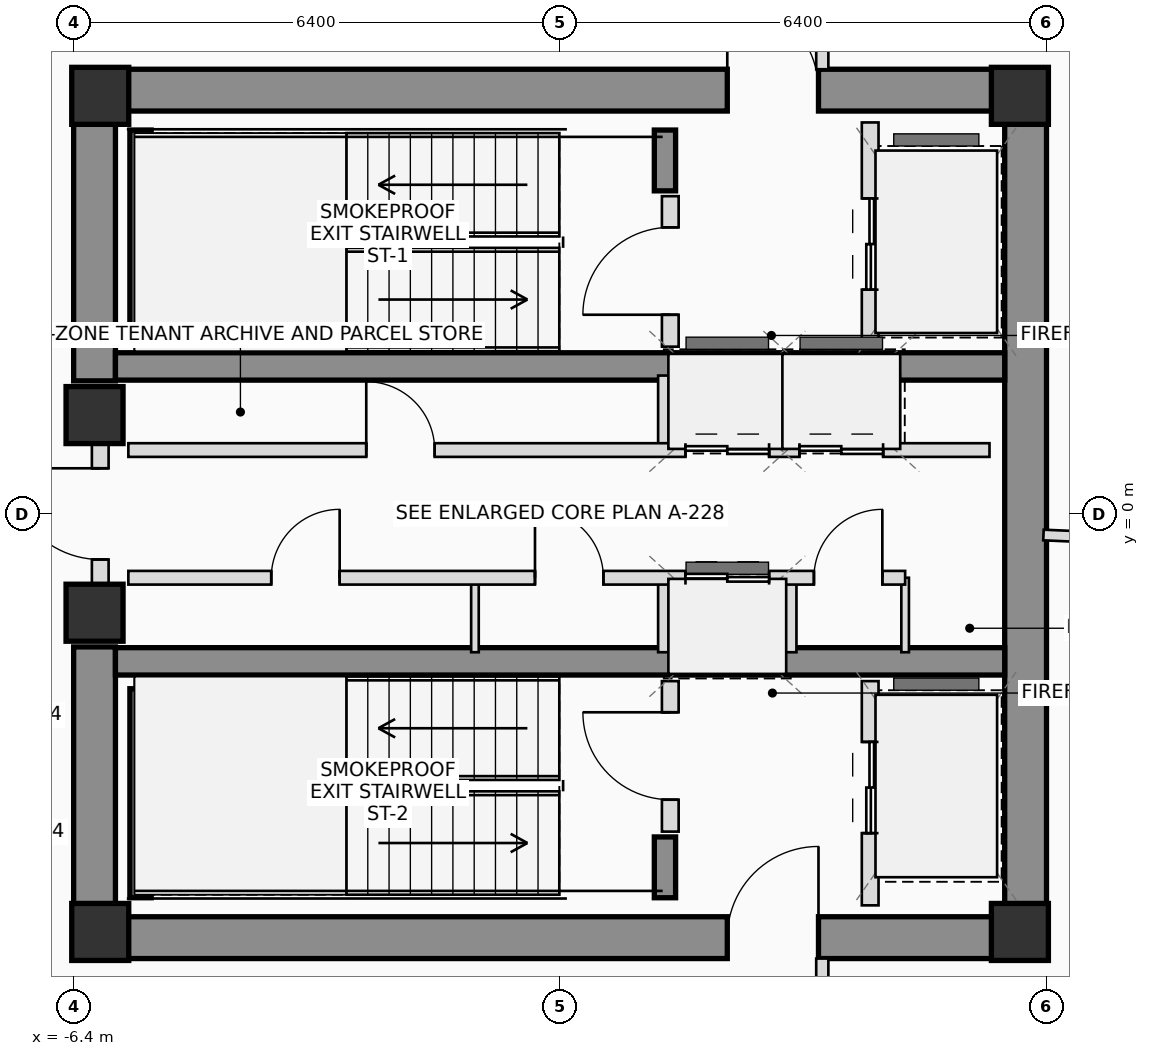
"""IFC4 building model, lengths in metres.
Left out: names, types, materials, properties, quantities, classifications, styles, units other than length and angle.
Written with IfcOpenShell. Run it as: python <this file> out.ifc"""

import sys

from ifc_helpers import new_model, si_unit, direction, frame, frame_2d, origin, origin_2d, place, context, subcontext, project, spatial, rectangle, extrude, source, transform, mapped, element, fill, save


model = new_model("IFC4")
c1 = context("Model", 3, precision=1e-05, world=origin(), true_north=direction((0.0, 1.0)))
c2 = subcontext(c1, "Body", "Model", "MODEL_VIEW")
j1 = project(units=[si_unit("LENGTHUNIT", "METRE"), si_unit("PLANEANGLEUNIT", "RADIAN")], contexts=[c1])
p1 = place(None, origin())
s1 = spatial("IfcSite", under=j1, at=p1, CompositionType="ELEMENT")
p2 = place(p1, origin())
s2 = spatial("IfcBuilding", under=s1, at=p2, CompositionType="ELEMENT")
p3 = place(p2, frame((0.0, 0.0, 310.55)))
s3 = spatial("IfcBuildingStorey", under=s2, at=p3, CompositionType="ELEMENT", Elevation=310.55)
m1 = source(origin(), c2, "Body", "SweptSolid", [
    extrude(rectangle(XDim=0.75, YDim=0.75, at=origin_2d()), origin(), (0.0, 0.0, 1.0), 3.45),
])
for number, where, z_axis, x_axis in (
    (1, (-6.05, -5.5, 0.0), (0.0, 0.0, 1.0), (1.0, 0.0, 0.0)),
    (2, (6.05, -5.5, 0.0), (0.0, 0.0, 1.0), (1.0, 0.0, 0.0)),
    (3, (6.05, 5.5, 0.0), (0.0, 0.0, 1.0), (1.0, 0.0, 0.0)),
    (4, (-6.05, 5.5, 0.0), (0.0, 0.0, 1.0), (1.0, 0.0, 0.0)),
):
    element("IfcColumn", number, at=place(p3, frame(where, z_axis=z_axis, x_axis=x_axis)), inside=s3, PredefinedType="COLUMN", context=c2, shape_type="MappedRepresentation", body=[
        mapped(m1, transform((0.0, 0.0, 0.0), scale=1.0)),
    ])
p4 = place(p3, frame((-6.4, 5.575, 0.0), z_axis=(0.0, 0.0, 1.0), x_axis=(1.0, 0.0, 0.0)))
e5 = element("IfcWall", 5, at=p4, inside=s3, PredefinedType="SHEAR", context=c2, shape_type="SweptSolid", body=[
    extrude(rectangle(XDim=12.8, YDim=0.55, at=frame_2d((6.4, 0.0))), origin(), (0.0, 0.0, 1.0), 3.45),
])
p5 = place(p4, frame((8.6, 0.0, 0.0)))
e6 = element("IfcOpeningElement", 6, at=p5, cuts=e5, PredefinedType="OPENING", context=c2, shape_type="SweptSolid", body=[
    extrude(rectangle(XDim=1.2, YDim=2.2, at=frame_2d((0.6, 1.1))), frame((0.0, 0.285, 0.0), z_axis=(0.0, -1.0, 0.0), x_axis=(1.0, 0.0, 0.0)), (0.0, 0.0, 1.0), 0.57),
])
p6 = place(p3, frame((-6.4, -5.575, 0.0), z_axis=(0.0, 0.0, 1.0), x_axis=(1.0, 0.0, 0.0)))
e7 = element("IfcWall", 7, at=p6, inside=s3, PredefinedType="SHEAR", context=c2, shape_type="SweptSolid", body=[
    extrude(rectangle(XDim=12.8, YDim=0.55, at=frame_2d((6.4, 0.0))), origin(), (0.0, 0.0, 1.0), 3.45),
])
p7 = place(p6, frame((8.6, 0.0, 0.0)))
e8 = element("IfcOpeningElement", 8, at=p7, cuts=e7, PredefinedType="OPENING", context=c2, shape_type="SweptSolid", body=[
    extrude(rectangle(XDim=1.2, YDim=2.2, at=frame_2d((0.6, 1.1))), frame((0.0, 0.285, 0.0), z_axis=(0.0, -1.0, 0.0), x_axis=(1.0, 0.0, 0.0)), (0.0, 0.0, 1.0), 0.57),
])
p8 = place(p3, frame((6.125, -5.3, 0.0), z_axis=(0.0, 0.0, 1.0), x_axis=(0.0, 1.0, 0.0)))
e9 = element("IfcWall", 9, at=p8, inside=s3, PredefinedType="SHEAR", context=c2, shape_type="SweptSolid", body=[
    extrude(rectangle(XDim=10.6, YDim=0.55, at=frame_2d((5.3, 0.0))), origin(), (0.0, 0.0, 1.0), 3.45),
])
for number, where, z_axis, x_axis in (
    (10, (-6.125, -5.3, 0.0), (0.0, 0.0, 1.0), (0.0, 1.0, 0.0)),
    (11, (-6.125, 1.75, 0.0), (0.0, 0.0, 1.0), (0.0, 1.0, 0.0)),
):
    element("IfcWall", number, at=place(p3, frame(where, z_axis=z_axis, x_axis=x_axis)), inside=s3, PredefinedType="SHEAR", context=c2, shape_type="SweptSolid", body=[
        extrude(rectangle(XDim=3.55, YDim=0.55, at=frame_2d((1.775, 0.0))), origin(), (0.0, 0.0, 1.0), 3.45),
    ])
for number, where, z_axis, x_axis in (
    (12, (-5.85, 1.94, 0.0), (0.0, 0.0, 1.0), (1.0, 0.0, 0.0)),
    (13, (-5.85, -1.94, 0.0), (0.0, 0.0, 1.0), (1.0, 0.0, 0.0)),
):
    element("IfcWall", number, at=place(p3, frame(where, z_axis=z_axis, x_axis=x_axis)), inside=s3, PredefinedType="SHEAR", context=c2, shape_type="SweptSolid", body=[
        extrude(rectangle(XDim=11.7, YDim=0.36, at=frame_2d((5.85, 0.0))), origin(), (0.0, 0.0, 1.0), 3.45),
    ])
p9 = place(p3, frame((-5.52, 2.3, 0.0), z_axis=(0.0, 0.0, 1.0), x_axis=(0.0, 1.0, 0.0)))
e14 = element("IfcWall", 14, at=p9, inside=s3, PredefinedType="SHEAR", context=c2, shape_type="SweptSolid", body=[
    extrude(rectangle(XDim=2.75, YDim=0.28, at=frame_2d((1.375, 0.0))), origin(), (0.0, 0.0, 1.0), 3.45),
])
p10 = place(p3, frame((1.38, 4.25, 0.0), z_axis=(0.0, 0.0, 1.0), x_axis=(0.0, 1.0, 0.0)))
e15 = element("IfcWall", 15, at=p10, inside=s3, PredefinedType="SHEAR", context=c2, shape_type="SweptSolid", body=[
    extrude(rectangle(XDim=0.8, YDim=0.28, at=frame_2d((0.4, 0.0))), origin(), (0.0, 0.0, 1.0), 3.45),
])
p11 = place(p3, frame((-5.52, -5.05, 0.0), z_axis=(0.0, 0.0, 1.0), x_axis=(0.0, 1.0, 0.0)))
e16 = element("IfcWall", 16, at=p11, inside=s3, PredefinedType="SHEAR", context=c2, shape_type="SweptSolid", body=[
    extrude(rectangle(XDim=2.75, YDim=0.28, at=frame_2d((1.375, 0.0))), origin(), (0.0, 0.0, 1.0), 3.45),
])
p12 = place(p3, frame((1.38, -5.05, 0.0), z_axis=(0.0, 0.0, 1.0), x_axis=(0.0, 1.0, 0.0)))
e17 = element("IfcWall", 17, at=p12, inside=s3, PredefinedType="SHEAR", context=c2, shape_type="SweptSolid", body=[
    extrude(rectangle(XDim=0.8, YDim=0.28, at=frame_2d((0.4, 0.0))), origin(), (0.0, 0.0, 1.0), 3.45),
])
for number, where, z_axis, x_axis in (
    (18, (-6.125, -1.3, 0.0), (0.0, 0.0, 1.0), (1.0, 0.0, 0.0)),
    (19, (-6.125, 1.3, 0.0), (0.0, 0.0, 1.0), (1.0, 0.0, 0.0)),
):
    element("IfcColumn", number, at=place(p3, frame(where, z_axis=z_axis, x_axis=x_axis)), inside=s3, PredefinedType="COLUMN", context=c2, shape_type="MappedRepresentation", body=[
        mapped(m1, transform((0.0, 0.0, 0.0), scale=1.0)),
    ])
p13 = place(p3, frame((-6.05, -0.95, 0.0), z_axis=(0.0, 0.0, 1.0), x_axis=(0.0, 1.0, 0.0)))
e20 = element("IfcWall", 20, at=p13, inside=s3, PredefinedType="PLUMBINGWALL", context=c2, shape_type="SweptSolid", body=[
    extrude(rectangle(XDim=1.9, YDim=0.22, at=frame_2d((0.95, 0.0))), origin(), (0.0, 0.0, 1.0), 2.23),
])
p14 = place(p13, frame((0.35, 0.0, 0.0)))
e21 = element("IfcOpeningElement", 21, at=p14, cuts=e20, PredefinedType="OPENING", context=c2, shape_type="SweptSolid", body=[
    extrude(rectangle(XDim=1.2, YDim=2.2, at=frame_2d((0.6, 1.1))), frame((0.0, 0.12, 0.0), z_axis=(0.0, -1.0, 0.0), x_axis=(1.0, 0.0, 0.0)), (0.0, 0.0, 1.0), 0.24),
])
p15 = place(p3, frame((1.45, 2.2, 0.0), z_axis=(0.0, 0.0, 1.0), x_axis=(0.0, 1.0, 0.0)))
e22 = element("IfcWall", 22, at=p15, inside=s3, PredefinedType="PLUMBINGWALL", context=c2, shape_type="SweptSolid", body=[
    extrude(rectangle(XDim=1.98, YDim=0.22, at=frame_2d((0.99, 0.0))), origin(), (0.0, 0.0, 1.0), 3.25),
])
p16 = place(p15, frame((0.42, 0.0, 0.0)))
e23 = element("IfcOpeningElement", 23, at=p16, cuts=e22, PredefinedType="OPENING", context=c2, shape_type="SweptSolid", body=[
    extrude(rectangle(XDim=1.15, YDim=2.15, at=frame_2d((0.575, 1.075))), frame((0.0, 0.12, 0.0), z_axis=(0.0, -1.0, 0.0), x_axis=(1.0, 0.0, 0.0)), (0.0, 0.0, 1.0), 0.24),
])
p17 = place(p3, frame((4.08, 2.2, 0.0), z_axis=(0.0, 0.0, 1.0), x_axis=(0.0, 1.0, 0.0)))
e24 = element("IfcWall", 24, at=p17, inside=s3, PredefinedType="PLUMBINGWALL", context=c2, shape_type="SweptSolid", body=[
    extrude(rectangle(XDim=2.95, YDim=0.22, at=frame_2d((1.475, 0.0))), origin(), (0.0, 0.0, 1.0), 3.25),
])
p18 = place(p17, frame((0.75, 0.0, 0.0)))
e25 = element("IfcOpeningElement", 25, at=p18, cuts=e24, PredefinedType="OPENING", context=c2, shape_type="SweptSolid", body=[
    extrude(rectangle(XDim=1.2, YDim=2.25, at=frame_2d((0.6, 1.125))), frame((0.0, 0.12, 0.0), z_axis=(0.0, -1.0, 0.0), x_axis=(1.0, 0.0, 0.0)), (0.0, 0.0, 1.0), 0.24),
])
p19 = place(p3, frame((1.45, -4.18, 0.0), z_axis=(0.0, 0.0, 1.0), x_axis=(0.0, 1.0, 0.0)))
e26 = element("IfcWall", 26, at=p19, inside=s3, PredefinedType="PLUMBINGWALL", context=c2, shape_type="SweptSolid", body=[
    extrude(rectangle(XDim=1.98, YDim=0.22, at=frame_2d((0.99, 0.0))), origin(), (0.0, 0.0, 1.0), 3.25),
])
p20 = place(p19, frame((0.42, 0.0, 0.0)))
e27 = element("IfcOpeningElement", 27, at=p20, cuts=e26, PredefinedType="OPENING", context=c2, shape_type="SweptSolid", body=[
    extrude(rectangle(XDim=1.15, YDim=2.15, at=frame_2d((0.575, 1.075))), frame((0.0, 0.12, 0.0), z_axis=(0.0, -1.0, 0.0), x_axis=(1.0, 0.0, 0.0)), (0.0, 0.0, 1.0), 0.24),
])
p21 = place(p3, frame((4.08, -5.15, 0.0), z_axis=(0.0, 0.0, 1.0), x_axis=(0.0, 1.0, 0.0)))
e28 = element("IfcWall", 28, at=p21, inside=s3, PredefinedType="PLUMBINGWALL", context=c2, shape_type="SweptSolid", body=[
    extrude(rectangle(XDim=2.95, YDim=0.22, at=frame_2d((1.475, 0.0))), origin(), (0.0, 0.0, 1.0), 3.25),
])
p22 = place(p21, frame((0.95, 0.0, 0.0)))
e29 = element("IfcOpeningElement", 29, at=p22, cuts=e28, PredefinedType="OPENING", context=c2, shape_type="SweptSolid", body=[
    extrude(rectangle(XDim=1.2, YDim=2.25, at=frame_2d((0.6, 1.125))), frame((0.0, 0.12, 0.0), z_axis=(0.0, -1.0, 0.0), x_axis=(1.0, 0.0, 0.0)), (0.0, 0.0, 1.0), 0.24),
])
p23 = place(p3, frame((-1.12, -1.82, 0.0), z_axis=(0.0, 0.0, 1.0), x_axis=(0.0, 1.0, 0.0)))
e30 = element("IfcWall", 30, at=p23, inside=s3, PredefinedType="PARTITIONING", context=c2, shape_type="SweptSolid", body=[
    extrude(rectangle(XDim=0.98, YDim=0.1, at=frame_2d((0.49, 0.0))), origin(), (0.0, 0.0, 1.0), 3.25),
])
for number, where, z_axis, x_axis in (
    (31, (1.38, 0.84, 0.0), (0.0, 0.0, 1.0), (0.0, 1.0, 0.0)),
    (32, (1.38, -1.82, 0.0), (0.0, 0.0, 1.0), (0.0, 1.0, 0.0)),
    (33, (3.02, 0.84, 0.0), (0.0, 0.0, 1.0), (0.0, 1.0, 0.0)),
    (34, (4.38, 0.84, 0.0), (0.0, 0.0, 1.0), (0.0, 1.0, 0.0)),
    (35, (3.02, -1.82, 0.0), (0.0, 0.0, 1.0), (0.0, 1.0, 0.0)),
):
    element("IfcWall", number, at=place(p3, frame(where, z_axis=z_axis, x_axis=x_axis)), inside=s3, PredefinedType="PLUMBINGWALL", context=c2, shape_type="SweptSolid", body=[
        extrude(rectangle(XDim=0.98, YDim=0.18, at=frame_2d((0.49, 0.0))), origin(), (0.0, 0.0, 1.0), 3.25),
    ])
p24 = place(p3, frame((4.54, -1.82, 0.0), z_axis=(0.0, 0.0, 1.0), x_axis=(0.0, 1.0, 0.0)))
e36 = element("IfcWall", 36, at=p24, inside=s3, PredefinedType="PARTITIONING", context=c2, shape_type="SweptSolid", body=[
    extrude(rectangle(XDim=0.98, YDim=0.1, at=frame_2d((0.49, 0.0))), origin(), (0.0, 0.0, 1.0), 3.25),
])
p25 = place(p3, frame((-5.68, 0.84, 0.0), z_axis=(0.0, 0.0, 1.0), x_axis=(1.0, 0.0, 0.0)))
e37 = element("IfcWall", 37, at=p25, inside=s3, PredefinedType="PLUMBINGWALL", context=c2, shape_type="SweptSolid", body=[
    extrude(rectangle(XDim=11.33, YDim=0.18, at=frame_2d((5.665, 0.0))), origin(), (0.0, 0.0, 1.0), 3.25),
])
p26 = place(p25, frame((3.13, 0.0, 0.0)))
e38 = element("IfcOpeningElement", 38, at=p26, cuts=e37, PredefinedType="OPENING", context=c2, shape_type="SweptSolid", body=[
    extrude(rectangle(XDim=0.9, YDim=2.05, at=frame_2d((0.45, 1.025))), frame((0.0, 0.1, 0.0), z_axis=(0.0, -1.0, 0.0), x_axis=(1.0, 0.0, 0.0)), (0.0, 0.0, 1.0), 0.2),
])
p27 = place(p25, frame((7.33, 0.0, 0.0)))
e39 = element("IfcOpeningElement", 39, at=p27, cuts=e37, PredefinedType="OPENING", context=c2, shape_type="SweptSolid", body=[
    extrude(rectangle(XDim=1.1, YDim=2.2, at=frame_2d((0.55, 1.1))), frame((0.0, 0.1, 0.0), z_axis=(0.0, -1.0, 0.0), x_axis=(1.0, 0.0, 0.0)), (0.0, 0.0, 1.0), 0.2),
])
p28 = place(p25, frame((8.83, 0.0, 0.0)))
e40 = element("IfcOpeningElement", 40, at=p28, cuts=e37, PredefinedType="OPENING", context=c2, shape_type="SweptSolid", body=[
    extrude(rectangle(XDim=1.1, YDim=2.2, at=frame_2d((0.55, 1.1))), frame((0.0, 0.1, 0.0), z_axis=(0.0, -1.0, 0.0), x_axis=(1.0, 0.0, 0.0)), (0.0, 0.0, 1.0), 0.2),
])
p29 = place(p3, frame((-5.68, -0.84, 0.0), z_axis=(0.0, 0.0, 1.0), x_axis=(1.0, 0.0, 0.0)))
e41 = element("IfcWall", 41, at=p29, inside=s3, PredefinedType="PLUMBINGWALL", context=c2, shape_type="SweptSolid", body=[
    extrude(rectangle(XDim=10.22, YDim=0.18, at=frame_2d((5.11, 0.0))), origin(), (0.0, 0.0, 1.0), 3.25),
])
p30 = place(p29, frame((1.88, 0.0, 0.0)))
e42 = element("IfcOpeningElement", 42, at=p30, cuts=e41, PredefinedType="OPENING", context=c2, shape_type="SweptSolid", body=[
    extrude(rectangle(XDim=0.9, YDim=2.05, at=frame_2d((0.45, 1.025))), frame((0.0, 0.1, 0.0), z_axis=(0.0, -1.0, 0.0), x_axis=(1.0, 0.0, 0.0)), (0.0, 0.0, 1.0), 0.2),
])
p31 = place(p29, frame((5.35, 0.0, 0.0)))
e43 = element("IfcOpeningElement", 43, at=p31, cuts=e41, PredefinedType="OPENING", context=c2, shape_type="SweptSolid", body=[
    extrude(rectangle(XDim=0.9, YDim=2.05, at=frame_2d((0.45, 1.025))), frame((0.0, 0.1, 0.0), z_axis=(0.0, -1.0, 0.0), x_axis=(1.0, 0.0, 0.0)), (0.0, 0.0, 1.0), 0.2),
])
p32 = place(p29, frame((7.33, 0.0, 0.0)))
e44 = element("IfcOpeningElement", 44, at=p32, cuts=e41, PredefinedType="OPENING", context=c2, shape_type="SweptSolid", body=[
    extrude(rectangle(XDim=1.1, YDim=2.2, at=frame_2d((0.55, 1.1))), frame((0.0, 0.1, 0.0), z_axis=(0.0, -1.0, 0.0), x_axis=(1.0, 0.0, 0.0)), (0.0, 0.0, 1.0), 0.2),
])
p33 = place(p29, frame((9.02, 0.0, 0.0)))
e45 = element("IfcOpeningElement", 45, at=p33, cuts=e41, PredefinedType="OPENING", context=c2, shape_type="SweptSolid", body=[
    extrude(rectangle(XDim=0.9, YDim=2.05, at=frame_2d((0.45, 1.025))), frame((0.0, 0.1, 0.0), z_axis=(0.0, -1.0, 0.0), x_axis=(1.0, 0.0, 0.0)), (0.0, 0.0, 1.0), 0.2),
])
p34 = place(p3, frame((3.45, 7.425, 0.0), z_axis=(0.0, 0.0, 1.0), x_axis=(0.0, -1.0, 0.0)))
e46 = element("IfcWall", 46, at=p34, inside=s3, PredefinedType="PARTITIONING", context=c2, shape_type="SweptSolid", body=[
    extrude(rectangle(XDim=1.575, YDim=0.16, at=frame_2d((0.787, 0.0))), origin(), (0.0, 0.0, 1.0), 2.855),
])
p35 = place(p3, frame((3.45, -5.85, 0.0), z_axis=(0.0, 0.0, 1.0), x_axis=(0.0, -1.0, 0.0)))
e47 = element("IfcWall", 47, at=p35, inside=s3, PredefinedType="PARTITIONING", context=c2, shape_type="SweptSolid", body=[
    extrude(rectangle(XDim=1.575, YDim=0.16, at=frame_2d((0.787, 0.0))), origin(), (0.0, 0.0, 1.0), 2.855),
])
p36 = place(p35, frame((0.287, 0.0, 0.0)))
e48 = element("IfcOpeningElement", 48, at=p36, cuts=e47, PredefinedType="OPENING", context=c2, shape_type="SweptSolid", body=[
    extrude(rectangle(XDim=1.0, YDim=2.25, at=frame_2d((0.5, 1.125))), frame((0.0, 0.09, 0.0), z_axis=(0.0, -1.0, 0.0), x_axis=(1.0, 0.0, 0.0)), (0.0, 0.0, 1.0), 0.18),
])
p37 = place(p3, frame((6.36, -0.278, 0.0), z_axis=(0.0, 0.0, 1.0), x_axis=(0.999047623791, -0.043633076864, 0.0)))
e49 = element("IfcWall", 49, at=p37, inside=s3, PredefinedType="PARTITIONING", context=c2, shape_type="SweptSolid", body=[
    extrude(rectangle(XDim=13.524, YDim=0.14, at=frame_2d((6.762, 0.0))), origin(), (0.0, 0.0, 1.0), 2.815),
])
p38 = place(p5, origin())
e50 = element("IfcDoor", 50, at=p38, inside=s3, OperationType="SINGLE_SWING_LEFT", PredefinedType="DOOR", context=c2, shape_type="SweptSolid", body=[
    extrude(rectangle(XDim=1.2, YDim=2.2, at=frame_2d((0.6, 1.1))), frame((0.0, 0.025, 0.0), z_axis=(0.0, -1.0, 0.0), x_axis=(1.0, 0.0, 0.0)), (0.0, 0.0, 1.0), 0.05),
])
fill(e6, e50)
p39 = place(p7, origin())
e51 = element("IfcDoor", 51, at=p39, inside=s3, OperationType="SINGLE_SWING_RIGHT", PredefinedType="DOOR", context=c2, shape_type="SweptSolid", body=[
    extrude(rectangle(XDim=1.2, YDim=2.2, at=frame_2d((0.6, 1.1))), frame((0.0, 0.025, 0.0), z_axis=(0.0, -1.0, 0.0), x_axis=(1.0, 0.0, 0.0)), (0.0, 0.0, 1.0), 0.05),
])
fill(e8, e51)
p40 = place(p14, origin())
e52 = element("IfcDoor", 52, at=p40, inside=s3, OperationType="SINGLE_SWING_RIGHT", PredefinedType="DOOR", context=c2, shape_type="SweptSolid", body=[
    extrude(rectangle(XDim=1.2, YDim=2.2, at=frame_2d((0.6, 1.1))), frame((0.0, 0.025, 0.0), z_axis=(0.0, -1.0, 0.0), x_axis=(1.0, 0.0, 0.0)), (0.0, 0.0, 1.0), 0.05),
])
fill(e21, e52)
p41 = place(p16, origin())
e53 = element("IfcDoor", 53, at=p41, inside=s3, OperationType="SINGLE_SWING_LEFT", PredefinedType="DOOR", context=c2, shape_type="SweptSolid", body=[
    extrude(rectangle(XDim=1.15, YDim=2.15, at=frame_2d((0.575, 1.075))), frame((0.0, 0.025, 0.0), z_axis=(0.0, -1.0, 0.0), x_axis=(1.0, 0.0, 0.0)), (0.0, 0.0, 1.0), 0.05),
])
fill(e23, e53)
p42 = place(p18, origin())
e54 = element("IfcDoor", 54, at=p42, inside=s3, OperationType="DOUBLE_DOOR_SLIDING", PredefinedType="DOOR", context=c2, shape_type="SweptSolid", body=[
    extrude(rectangle(XDim=1.2, YDim=2.25, at=frame_2d((0.6, 1.125))), frame((0.0, 0.025, 0.0), z_axis=(0.0, -1.0, 0.0), x_axis=(1.0, 0.0, 0.0)), (0.0, 0.0, 1.0), 0.05),
])
fill(e25, e54)
p43 = place(p20, origin())
e55 = element("IfcDoor", 55, at=p43, inside=s3, OperationType="SINGLE_SWING_RIGHT", PredefinedType="DOOR", context=c2, shape_type="SweptSolid", body=[
    extrude(rectangle(XDim=1.15, YDim=2.15, at=frame_2d((0.575, 1.075))), frame((0.0, 0.025, 0.0), z_axis=(0.0, -1.0, 0.0), x_axis=(1.0, 0.0, 0.0)), (0.0, 0.0, 1.0), 0.05),
])
fill(e27, e55)
p44 = place(p22, origin())
e56 = element("IfcDoor", 56, at=p44, inside=s3, OperationType="DOUBLE_DOOR_SLIDING", PredefinedType="DOOR", context=c2, shape_type="SweptSolid", body=[
    extrude(rectangle(XDim=1.2, YDim=2.25, at=frame_2d((0.6, 1.125))), frame((0.0, 0.025, 0.0), z_axis=(0.0, -1.0, 0.0), x_axis=(1.0, 0.0, 0.0)), (0.0, 0.0, 1.0), 0.05),
])
fill(e29, e56)
p45 = place(p26, origin())
e57 = element("IfcDoor", 57, at=p45, inside=s3, OperationType="SINGLE_SWING_LEFT", PredefinedType="DOOR", context=c2, shape_type="SweptSolid", body=[
    extrude(rectangle(XDim=0.9, YDim=2.05, at=frame_2d((0.45, 1.025))), frame((0.0, 0.025, 0.0), z_axis=(0.0, -1.0, 0.0), x_axis=(1.0, 0.0, 0.0)), (0.0, 0.0, 1.0), 0.05),
])
fill(e38, e57)
p46 = place(p27, origin())
e58 = element("IfcDoor", 58, at=p46, inside=s3, OperationType="DOUBLE_DOOR_SLIDING", PredefinedType="DOOR", context=c2, shape_type="SweptSolid", body=[
    extrude(rectangle(XDim=1.1, YDim=2.2, at=frame_2d((0.55, 1.1))), frame((0.0, 0.025, 0.0), z_axis=(0.0, -1.0, 0.0), x_axis=(1.0, 0.0, 0.0)), (0.0, 0.0, 1.0), 0.05),
])
fill(e39, e58)
p47 = place(p28, origin())
e59 = element("IfcDoor", 59, at=p47, inside=s3, OperationType="DOUBLE_DOOR_SLIDING", PredefinedType="DOOR", context=c2, shape_type="SweptSolid", body=[
    extrude(rectangle(XDim=1.1, YDim=2.2, at=frame_2d((0.55, 1.1))), frame((0.0, 0.025, 0.0), z_axis=(0.0, -1.0, 0.0), x_axis=(1.0, 0.0, 0.0)), (0.0, 0.0, 1.0), 0.05),
])
fill(e40, e59)
p48 = place(p30, origin())
e60 = element("IfcDoor", 60, at=p48, inside=s3, OperationType="SINGLE_SWING_RIGHT", PredefinedType="DOOR", context=c2, shape_type="SweptSolid", body=[
    extrude(rectangle(XDim=0.9, YDim=2.05, at=frame_2d((0.45, 1.025))), frame((0.0, 0.025, 0.0), z_axis=(0.0, -1.0, 0.0), x_axis=(1.0, 0.0, 0.0)), (0.0, 0.0, 1.0), 0.05),
])
fill(e42, e60)
p49 = place(p31, origin())
e61 = element("IfcDoor", 61, at=p49, inside=s3, OperationType="SINGLE_SWING_LEFT", PredefinedType="DOOR", context=c2, shape_type="SweptSolid", body=[
    extrude(rectangle(XDim=0.9, YDim=2.05, at=frame_2d((0.45, 1.025))), frame((0.0, 0.025, 0.0), z_axis=(0.0, -1.0, 0.0), x_axis=(1.0, 0.0, 0.0)), (0.0, 0.0, 1.0), 0.05),
])
fill(e43, e61)
p50 = place(p32, origin())
e62 = element("IfcDoor", 62, at=p50, inside=s3, OperationType="DOUBLE_DOOR_SLIDING", PredefinedType="DOOR", context=c2, shape_type="SweptSolid", body=[
    extrude(rectangle(XDim=1.1, YDim=2.2, at=frame_2d((0.55, 1.1))), frame((0.0, 0.025, 0.0), z_axis=(0.0, -1.0, 0.0), x_axis=(1.0, 0.0, 0.0)), (0.0, 0.0, 1.0), 0.05),
])
fill(e44, e62)
p51 = place(p33, origin())
e63 = element("IfcDoor", 63, at=p51, inside=s3, OperationType="SINGLE_SWING_RIGHT", PredefinedType="DOOR", context=c2, shape_type="SweptSolid", body=[
    extrude(rectangle(XDim=0.9, YDim=2.05, at=frame_2d((0.45, 1.025))), frame((0.0, 0.025, 0.0), z_axis=(0.0, -1.0, 0.0), x_axis=(1.0, 0.0, 0.0)), (0.0, 0.0, 1.0), 0.05),
])
fill(e45, e63)
save(model, sys.argv[1])
